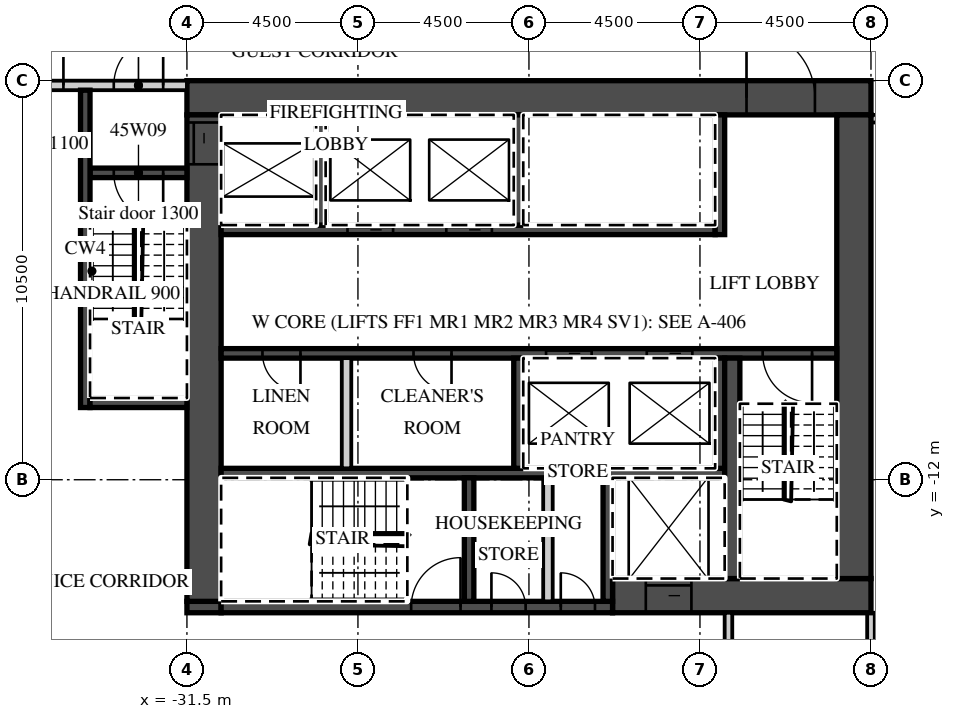
"""IFC4 building model, lengths in metres.
Left out: names, types, materials, properties, quantities, classifications, styles, units other than length and angle.
Written with IfcOpenShell. Run it as: python <this file> out.ifc"""

import sys

from ifc_helpers import new_model, si_unit, direction, frame, frame_2d, origin, place, context, subcontext, project, spatial, rectangle, extrude, element, fill, save


model = new_model("IFC4")
c1 = context("Model", 3, precision=1e-05, world=origin(), true_north=direction((0.0, 1.0)))
c2 = subcontext(c1, "Body", "Model", "MODEL_VIEW")
j1 = project(units=[si_unit("LENGTHUNIT", "METRE"), si_unit("PLANEANGLEUNIT", "RADIAN")], contexts=[c1])
p1 = place(None, origin())
s1 = spatial("IfcSite", under=j1, at=p1, CompositionType="ELEMENT")
p2 = place(p1, origin())
s2 = spatial("IfcBuilding", under=s1, at=p2, CompositionType="ELEMENT")
p3 = place(p2, frame((0.0, 0.0, 190.0)))
s3 = spatial("IfcBuildingStorey", under=s2, at=p3, CompositionType="ELEMENT", Elevation=190.0)
p4 = place(p3, frame((-13.5, -22.3, 0.0), z_axis=(0.0, 0.0, 1.0), x_axis=(0.0, 1.0, 0.0)))
e1 = element("IfcWall", 1, at=p4, inside=s3, PredefinedType="PARTITIONING", context=c2, shape_type="SweptSolid", body=[
    extrude(rectangle(XDim=6.8, YDim=0.2, at=frame_2d((3.4, 0.0))), origin(), (0.0, 0.0, 1.0), 3.02),
])
p5 = place(p3, frame((-13.5, -2.5, 0.0), z_axis=(0.0, 0.0, 1.0), x_axis=(1.0, 0.0, 0.0)))
e2 = element("IfcWall", 2, at=p5, inside=s3, PredefinedType="PARTITIONING", context=c2, shape_type="SweptSolid", body=[
    extrude(rectangle(XDim=27.0, YDim=0.2, at=frame_2d((13.5, 0.0))), origin(), (0.0, 0.0, 1.0), 3.02),
])
p6 = place(p5, frame((0.575, 0.0, 0.0)))
e3 = element("IfcOpeningElement", 3, at=p6, cuts=e2, PredefinedType="OPENING", context=c2, shape_type="SweptSolid", body=[
    extrude(rectangle(XDim=1.0, YDim=2.1, at=frame_2d((0.5, 1.05))), frame((0.0, 0.11, 0.0), z_axis=(0.0, -1.0, 0.0), x_axis=(1.0, 0.0, 0.0)), (0.0, 0.0, 1.0), 0.22),
])
p7 = place(p5, frame((7.45, 0.0, 0.0)))
e4 = element("IfcOpeningElement", 4, at=p7, cuts=e2, PredefinedType="OPENING", context=c2, shape_type="SweptSolid", body=[
    extrude(rectangle(XDim=1.0, YDim=2.1, at=frame_2d((0.5, 1.05))), frame((0.0, 0.11, 0.0), z_axis=(0.0, -1.0, 0.0), x_axis=(1.0, 0.0, 0.0)), (0.0, 0.0, 1.0), 0.22),
])
p8 = place(p5, frame((9.55, 0.0, 0.0)))
e5 = element("IfcOpeningElement", 5, at=p8, cuts=e2, PredefinedType="OPENING", context=c2, shape_type="SweptSolid", body=[
    extrude(rectangle(XDim=1.0, YDim=2.1, at=frame_2d((0.5, 1.05))), frame((0.0, 0.11, 0.0), z_axis=(0.0, -1.0, 0.0), x_axis=(1.0, 0.0, 0.0)), (0.0, 0.0, 1.0), 0.22),
])
p9 = place(p5, frame((18.862, 0.0, 0.0)))
e6 = element("IfcOpeningElement", 6, at=p9, cuts=e2, PredefinedType="OPENING", context=c2, shape_type="SweptSolid", body=[
    extrude(rectangle(XDim=1.2, YDim=2.1, at=frame_2d((0.6, 1.05))), frame((0.0, 0.11, 0.0), z_axis=(0.0, -1.0, 0.0), x_axis=(1.0, 0.0, 0.0)), (0.0, 0.0, 1.0), 0.22),
])
p10 = place(p5, frame((23.075, 0.0, 0.0)))
e7 = element("IfcOpeningElement", 7, at=p10, cuts=e2, PredefinedType="OPENING", context=c2, shape_type="SweptSolid", body=[
    extrude(rectangle(XDim=1.0, YDim=2.1, at=frame_2d((0.5, 1.05))), frame((0.0, 0.11, 0.0), z_axis=(0.0, -1.0, 0.0), x_axis=(1.0, 0.0, 0.0)), (0.0, 0.0, 1.0), 0.22),
])
p11 = place(p3, frame((-31.5, -1.95, 0.0), z_axis=(0.0, 0.0, 1.0), x_axis=(1.0, 0.0, 0.0)))
e8 = element("IfcWall", 8, at=p11, inside=s3, PredefinedType="SHEAR", context=c2, shape_type="SweptSolid", body=[
    extrude(rectangle(XDim=18.0, YDim=0.9, at=frame_2d((9.0, 0.0))), origin(), (0.0, 0.0, 1.0), 3.02),
])
p12 = place(p11, frame((14.725, 0.0, 0.0)))
e9 = element("IfcOpeningElement", 9, at=p12, cuts=e8, PredefinedType="OPENING", context=c2, shape_type="SweptSolid", body=[
    extrude(rectangle(XDim=1.8, YDim=2.1, at=frame_2d((0.9, 1.05))), frame((0.0, 0.46, 0.0), z_axis=(0.0, -1.0, 0.0), x_axis=(1.0, 0.0, 0.0)), (0.0, 0.0, 1.0), 0.92),
])
p13 = place(p3, frame((-20.3, -15.05, 0.0), z_axis=(0.0, 0.0, 1.0), x_axis=(1.0, 0.0, 0.0)))
e10 = element("IfcWall", 10, at=p13, inside=s3, PredefinedType="SHEAR", context=c2, shape_type="SweptSolid", body=[
    extrude(rectangle(XDim=6.8, YDim=0.9, at=frame_2d((3.4, 0.0))), origin(), (0.0, 0.0, 1.0), 3.02),
])
p14 = place(p13, frame((0.875, 0.0, 0.0)))
e11 = element("IfcOpeningElement", 11, at=p14, cuts=e10, PredefinedType="OPENING", context=c2, shape_type="SweptSolid", body=[
    extrude(rectangle(XDim=1.2, YDim=2.1, at=frame_2d((0.6, 1.05))), frame((0.0, 0.46, 0.0), z_axis=(0.0, -1.0, 0.0), x_axis=(1.0, 0.0, 0.0)), (0.0, 0.0, 1.0), 0.92),
])
p15 = place(p3, frame((-31.5, -15.35, 0.0), z_axis=(0.0, 0.0, 1.0), x_axis=(1.0, 0.0, 0.0)))
e12 = element("IfcWall", 12, at=p15, inside=s3, PredefinedType="SHEAR", context=c2, shape_type="SweptSolid", body=[
    extrude(rectangle(XDim=0.9, YDim=0.3, at=frame_2d((0.45, 0.0))), origin(), (0.0, 0.0, 1.0), 3.02),
])
p16 = place(p3, frame((-30.6, -15.35, 0.0), z_axis=(0.0, 0.0, 1.0), x_axis=(1.0, 0.0, 0.0)))
e13 = element("IfcWall", 13, at=p16, inside=s3, PredefinedType="SHEAR", context=c2, shape_type="SweptSolid", body=[
    extrude(rectangle(XDim=10.3, YDim=0.3, at=frame_2d((5.15, 0.0))), origin(), (0.0, 0.0, 1.0), 3.02),
])
p17 = place(p16, frame((5.0, 0.0, 0.0)))
e14 = element("IfcOpeningElement", 14, at=p17, cuts=e13, PredefinedType="OPENING", context=c2, shape_type="SweptSolid", body=[
    extrude(rectangle(XDim=1.3, YDim=2.1, at=frame_2d((0.65, 1.05))), frame((0.0, 0.16, 0.0), z_axis=(0.0, -1.0, 0.0), x_axis=(1.0, 0.0, 0.0)), (0.0, 0.0, 1.0), 0.32),
])
p18 = place(p16, frame((7.113, 0.0, 0.0)))
e15 = element("IfcOpeningElement", 15, at=p18, cuts=e13, PredefinedType="OPENING", context=c2, shape_type="SweptSolid", body=[
    extrude(rectangle(XDim=0.9, YDim=2.1, at=frame_2d((0.45, 1.05))), frame((0.0, 0.16, 0.0), z_axis=(0.0, -1.0, 0.0), x_axis=(1.0, 0.0, 0.0)), (0.0, 0.0, 1.0), 0.32),
])
p19 = place(p16, frame((8.938, 0.0, 0.0)))
e16 = element("IfcOpeningElement", 16, at=p19, cuts=e13, PredefinedType="OPENING", context=c2, shape_type="SweptSolid", body=[
    extrude(rectangle(XDim=0.9, YDim=2.1, at=frame_2d((0.45, 1.05))), frame((0.0, 0.16, 0.0), z_axis=(0.0, -1.0, 0.0), x_axis=(1.0, 0.0, 0.0)), (0.0, 0.0, 1.0), 0.32),
])
p20 = place(p3, frame((-31.05, -15.2, 0.0), z_axis=(0.0, 0.0, 1.0), x_axis=(0.0, 1.0, 0.0)))
e17 = element("IfcWall", 17, at=p20, inside=s3, PredefinedType="SHEAR", context=c2, shape_type="SweptSolid", body=[
    extrude(rectangle(XDim=12.8, YDim=0.9, at=frame_2d((6.4, 0.0))), origin(), (0.0, 0.0, 1.0), 3.02),
])
p21 = place(p20, frame((11.5, 0.0, 0.0)))
e18 = element("IfcOpeningElement", 18, at=p21, cuts=e17, PredefinedType="OPENING", context=c2, shape_type="SweptSolid", body=[
    extrude(rectangle(XDim=1.1, YDim=2.1, at=frame_2d((0.55, 1.05))), frame((0.0, 0.46, 0.0), z_axis=(0.0, -1.0, 0.0), x_axis=(1.0, 0.0, 0.0)), (0.0, 0.0, 1.0), 0.92),
])
p22 = place(p3, frame((-13.95, -14.6, 0.0), z_axis=(0.0, 0.0, 1.0), x_axis=(0.0, 1.0, 0.0)))
e19 = element("IfcWall", 19, at=p22, inside=s3, PredefinedType="SHEAR", context=c2, shape_type="SweptSolid", body=[
    extrude(rectangle(XDim=12.2, YDim=0.9, at=frame_2d((6.1, 0.0))), origin(), (0.0, 0.0, 1.0), 3.02),
])
p23 = place(p3, frame((-30.6, -5.425, 0.0), z_axis=(0.0, 0.0, 1.0), x_axis=(1.0, 0.0, 0.0)))
e20 = element("IfcWall", 20, at=p23, inside=s3, PredefinedType="SHEAR", context=c2, shape_type="SweptSolid", body=[
    extrude(rectangle(XDim=13.0, YDim=0.25, at=frame_2d((6.5, 0.0))), origin(), (0.0, 0.0, 1.0), 3.02),
])
p24 = place(p23, frame((3.325, 0.0, 0.0)))
e21 = element("IfcOpeningElement", 21, at=p24, cuts=e20, PredefinedType="OPENING", context=c2, shape_type="SweptSolid", body=[
    extrude(rectangle(XDim=1.2, YDim=2.1, at=frame_2d((0.6, 1.05))), frame((0.0, 0.135, 0.0), z_axis=(0.0, -1.0, 0.0), x_axis=(1.0, 0.0, 0.0)), (0.0, 0.0, 1.0), 0.27),
])
p25 = place(p23, frame((5.925, 0.0, 0.0)))
e22 = element("IfcOpeningElement", 22, at=p25, cuts=e20, PredefinedType="OPENING", context=c2, shape_type="SweptSolid", body=[
    extrude(rectangle(XDim=1.2, YDim=2.1, at=frame_2d((0.6, 1.05))), frame((0.0, 0.135, 0.0), z_axis=(0.0, -1.0, 0.0), x_axis=(1.0, 0.0, 0.0)), (0.0, 0.0, 1.0), 0.27),
])
p26 = place(p3, frame((-17.475, -5.55, 0.0), z_axis=(0.0, 0.0, 1.0), x_axis=(0.0, 1.0, 0.0)))
e23 = element("IfcWall", 23, at=p26, inside=s3, PredefinedType="SHEAR", context=c2, shape_type="SweptSolid", body=[
    extrude(rectangle(XDim=3.15, YDim=0.25, at=frame_2d((1.575, 0.0))), origin(), (0.0, 0.0, 1.0), 3.02),
])
for number, where, z_axis, x_axis in (
    (24, (-27.975, -5.3, 0.0), (0.0, 0.0, 1.0), (0.0, 1.0, 0.0)),
    (25, (-22.775, -5.3, 0.0), (0.0, 0.0, 1.0), (0.0, 1.0, 0.0)),
):
    element("IfcWall", number, at=place(p3, frame(where, z_axis=z_axis, x_axis=x_axis)), inside=s3, PredefinedType="SHEAR", context=c2, shape_type="SweptSolid", body=[
        extrude(rectangle(XDim=2.9, YDim=0.25, at=frame_2d((1.45, 0.0))), origin(), (0.0, 0.0, 1.0), 3.02),
    ])
p27 = place(p3, frame((-30.6, -8.675, 0.0), z_axis=(0.0, 0.0, 1.0), x_axis=(1.0, 0.0, 0.0)))
e26 = element("IfcWall", 26, at=p27, inside=s3, PredefinedType="SHEAR", context=c2, shape_type="SweptSolid", body=[
    extrude(rectangle(XDim=16.2, YDim=0.25, at=frame_2d((8.1, 0.0))), origin(), (0.0, 0.0, 1.0), 3.02),
])
p28 = place(p27, frame((8.55, 0.0, 0.0)))
e27 = element("IfcOpeningElement", 27, at=p28, cuts=e26, PredefinedType="OPENING", context=c2, shape_type="SweptSolid", body=[
    extrude(rectangle(XDim=1.2, YDim=2.1, at=frame_2d((0.6, 1.05))), frame((0.0, 0.135, 0.0), z_axis=(0.0, -1.0, 0.0), x_axis=(1.0, 0.0, 0.0)), (0.0, 0.0, 1.0), 0.27),
])
p29 = place(p27, frame((11.2, 0.0, 0.0)))
e28 = element("IfcOpeningElement", 28, at=p29, cuts=e26, PredefinedType="OPENING", context=c2, shape_type="SweptSolid", body=[
    extrude(rectangle(XDim=1.2, YDim=2.1, at=frame_2d((0.6, 1.05))), frame((0.0, 0.135, 0.0), z_axis=(0.0, -1.0, 0.0), x_axis=(1.0, 0.0, 0.0)), (0.0, 0.0, 1.0), 0.27),
])
p30 = place(p27, frame((14.25, 0.0, 0.0)))
e29 = element("IfcOpeningElement", 29, at=p30, cuts=e26, PredefinedType="OPENING", context=c2, shape_type="SweptSolid", body=[
    extrude(rectangle(XDim=1.3, YDim=2.1, at=frame_2d((0.65, 1.05))), frame((0.0, 0.135, 0.0), z_axis=(0.0, -1.0, 0.0), x_axis=(1.0, 0.0, 0.0)), (0.0, 0.0, 1.0), 0.27),
])
p31 = place(p27, frame((1.087, 0.0, 0.0)))
e30 = element("IfcOpeningElement", 30, at=p31, cuts=e26, PredefinedType="OPENING", context=c2, shape_type="SweptSolid", body=[
    extrude(rectangle(XDim=1.0, YDim=2.1, at=frame_2d((0.5, 1.05))), frame((0.0, 0.135, 0.0), z_axis=(0.0, -1.0, 0.0), x_axis=(1.0, 0.0, 0.0)), (0.0, 0.0, 1.0), 0.27),
])
p32 = place(p27, frame((5.062, 0.0, 0.0)))
e31 = element("IfcOpeningElement", 31, at=p32, cuts=e26, PredefinedType="OPENING", context=c2, shape_type="SweptSolid", body=[
    extrude(rectangle(XDim=1.0, YDim=2.1, at=frame_2d((0.5, 1.05))), frame((0.0, 0.135, 0.0), z_axis=(0.0, -1.0, 0.0), x_axis=(1.0, 0.0, 0.0)), (0.0, 0.0, 1.0), 0.27),
])
p33 = place(p3, frame((-30.6, -11.825, 0.0), z_axis=(0.0, 0.0, 1.0), x_axis=(1.0, 0.0, 0.0)))
e32 = element("IfcWall", 32, at=p33, inside=s3, PredefinedType="SHEAR", context=c2, shape_type="SweptSolid", body=[
    extrude(rectangle(XDim=13.25, YDim=0.25, at=frame_2d((6.625, 0.0))), origin(), (0.0, 0.0, 1.0), 3.02),
])
for number, where, z_axis, x_axis in (
    (33, (-17.475, -11.7, 0.0), (0.0, 0.0, 1.0), (0.0, 1.0, 0.0)),
    (34, (-22.775, -11.7, 0.0), (0.0, 0.0, 1.0), (0.0, 1.0, 0.0)),
):
    element("IfcWall", number, at=place(p3, frame(where, z_axis=z_axis, x_axis=x_axis)), inside=s3, PredefinedType="SHEAR", context=c2, shape_type="SweptSolid", body=[
        extrude(rectangle(XDim=2.9, YDim=0.25, at=frame_2d((1.45, 0.0))), origin(), (0.0, 0.0, 1.0), 3.02),
    ])
p34 = place(p3, frame((-27.3, -11.7, 0.0), z_axis=(0.0, 0.0, 1.0), x_axis=(0.0, 1.0, 0.0)))
e35 = element("IfcWall", 35, at=p34, inside=s3, PredefinedType="PARTITIONING", context=c2, shape_type="SweptSolid", body=[
    extrude(rectangle(XDim=2.9, YDim=0.25, at=frame_2d((1.45, 0.0))), origin(), (0.0, 0.0, 1.0), 3.02),
])
p35 = place(p3, frame((-17.15, -14.6, 0.0), z_axis=(0.0, 0.0, 1.0), x_axis=(0.0, 1.0, 0.0)))
e36 = element("IfcWall", 36, at=p35, inside=s3, PredefinedType="SHEAR", context=c2, shape_type="SweptSolid", body=[
    extrude(rectangle(XDim=5.8, YDim=0.4, at=frame_2d((2.9, 0.0))), origin(), (0.0, 0.0, 1.0), 3.02),
])
for number, where, z_axis, x_axis in (
    (37, (-20.425, -15.2, 0.0), (0.0, 0.0, 1.0), (0.0, 1.0, 0.0)),
    (38, (-24.075, -15.2, 0.0), (0.0, 0.0, 1.0), (0.0, 1.0, 0.0)),
):
    element("IfcWall", number, at=place(p3, frame(where, z_axis=z_axis, x_axis=x_axis)), inside=s3, PredefinedType="SHEAR", context=c2, shape_type="SweptSolid", body=[
        extrude(rectangle(XDim=3.25, YDim=0.25, at=frame_2d((1.625, 0.0))), origin(), (0.0, 0.0, 1.0), 3.02),
    ])
p36 = place(p3, frame((-22.0, -15.2, 0.0), z_axis=(0.0, 0.0, 1.0), x_axis=(0.0, 1.0, 0.0)))
e39 = element("IfcWall", 39, at=p36, inside=s3, PredefinedType="PARTITIONING", context=c2, shape_type="SweptSolid", body=[
    extrude(rectangle(XDim=3.25, YDim=0.25, at=frame_2d((1.625, 0.0))), origin(), (0.0, 0.0, 1.0), 3.02),
])
p37 = place(p3, frame((-42.632, -1.625, 0.0), z_axis=(0.0, 0.0, 1.0), x_axis=(1.0, 0.0, 0.0)))
e40 = element("IfcWall", 40, at=p37, inside=s3, PredefinedType="PARTITIONING", context=c2, shape_type="SweptSolid", body=[
    extrude(rectangle(XDim=11.132, YDim=0.25, at=frame_2d((5.566, 0.0))), origin(), (0.0, 0.0, 1.0), 3.02),
])
p38 = place(p37, frame((9.207, 0.0, 0.0)))
e41 = element("IfcOpeningElement", 41, at=p38, cuts=e40, PredefinedType="OPENING", context=c2, shape_type="SweptSolid", body=[
    extrude(rectangle(XDim=1.3, YDim=2.1, at=frame_2d((0.65, 1.05))), frame((0.0, 0.135, 0.0), z_axis=(0.0, -1.0, 0.0), x_axis=(1.0, 0.0, 0.0)), (0.0, 0.0, 1.0), 0.27),
])
p39 = place(p37, frame((6.781, 0.0, 0.0)))
e42 = element("IfcOpeningElement", 42, at=p39, cuts=e40, PredefinedType="OPENING", context=c2, shape_type="SweptSolid", body=[
    extrude(rectangle(XDim=1.1, YDim=2.1, at=frame_2d((0.55, 1.05))), frame((0.0, 0.135, 0.0), z_axis=(0.0, -1.0, 0.0), x_axis=(1.0, 0.0, 0.0)), (0.0, 0.0, 1.0), 0.27),
])
p40 = place(p3, frame((-34.05, -3.925, 0.0), z_axis=(0.0, 0.0, 1.0), x_axis=(1.0, 0.0, 0.0)))
e43 = element("IfcWall", 43, at=p40, inside=s3, PredefinedType="SHEAR", context=c2, shape_type="SweptSolid", body=[
    extrude(rectangle(XDim=2.55, YDim=0.25, at=frame_2d((1.275, 0.0))), origin(), (0.0, 0.0, 1.0), 3.02),
])
p41 = place(p40, frame((0.625, 0.0, 0.0)))
e44 = element("IfcOpeningElement", 44, at=p41, cuts=e43, PredefinedType="OPENING", context=c2, shape_type="SweptSolid", body=[
    extrude(rectangle(XDim=1.3, YDim=2.1, at=frame_2d((0.65, 1.05))), frame((0.0, 0.135, 0.0), z_axis=(0.0, -1.0, 0.0), x_axis=(1.0, 0.0, 0.0)), (0.0, 0.0, 1.0), 0.27),
])
p42 = place(p3, frame((-34.175, -10.1, 0.0), z_axis=(0.0, 0.0, 1.0), x_axis=(0.0, 1.0, 0.0)))
e45 = element("IfcWall", 45, at=p42, inside=s3, PredefinedType="SHEAR", context=c2, shape_type="SweptSolid", body=[
    extrude(rectangle(XDim=8.35, YDim=0.25, at=frame_2d((4.175, 0.0))), origin(), (0.0, 0.0, 1.0), 3.02),
])
p43 = place(p3, frame((-34.05, -9.975, 0.0), z_axis=(0.0, 0.0, 1.0), x_axis=(1.0, 0.0, 0.0)))
e46 = element("IfcWall", 46, at=p43, inside=s3, PredefinedType="SHEAR", context=c2, shape_type="SweptSolid", body=[
    extrude(rectangle(XDim=2.55, YDim=0.25, at=frame_2d((1.275, 0.0))), origin(), (0.0, 0.0, 1.0), 3.02),
])
p44 = place(p3, frame((-17.25, -17.7, 0.0), z_axis=(0.0, 0.0, 1.0), x_axis=(0.0, 1.0, 0.0)))
e47 = element("IfcWall", 47, at=p44, inside=s3, PredefinedType="PARTITIONING", context=c2, shape_type="SweptSolid", body=[
    extrude(rectangle(XDim=2.2, YDim=0.2, at=frame_2d((1.1, 0.0))), origin(), (0.0, 0.0, 1.0), 3.02),
])
p45 = place(p28, origin())
e48 = element("IfcDoor", 48, at=p45, inside=s3, OperationType="SLIDING_TO_LEFT", PredefinedType="DOOR", context=c2, shape_type="SweptSolid", body=[
    extrude(rectangle(XDim=1.2, YDim=2.1, at=frame_2d((0.6, 1.05))), frame((0.0, 0.025, 0.0), z_axis=(0.0, -1.0, 0.0), x_axis=(1.0, 0.0, 0.0)), (0.0, 0.0, 1.0), 0.05),
])
fill(e27, e48)
p46 = place(p29, origin())
e49 = element("IfcDoor", 49, at=p46, inside=s3, OperationType="SLIDING_TO_RIGHT", PredefinedType="DOOR", context=c2, shape_type="SweptSolid", body=[
    extrude(rectangle(XDim=1.2, YDim=2.1, at=frame_2d((0.6, 1.05))), frame((0.0, 0.025, 0.0), z_axis=(0.0, -1.0, 0.0), x_axis=(1.0, 0.0, 0.0)), (0.0, 0.0, 1.0), 0.05),
])
fill(e28, e49)
p47 = place(p24, origin())
e50 = element("IfcDoor", 50, at=p47, inside=s3, OperationType="SLIDING_TO_RIGHT", PredefinedType="DOOR", context=c2, shape_type="SweptSolid", body=[
    extrude(rectangle(XDim=1.2, YDim=2.1, at=frame_2d((0.6, 1.05))), frame((0.0, 0.025, 0.0), z_axis=(0.0, -1.0, 0.0), x_axis=(1.0, 0.0, 0.0)), (0.0, 0.0, 1.0), 0.05),
])
fill(e21, e50)
p48 = place(p25, origin())
e51 = element("IfcDoor", 51, at=p48, inside=s3, OperationType="SLIDING_TO_RIGHT", PredefinedType="DOOR", context=c2, shape_type="SweptSolid", body=[
    extrude(rectangle(XDim=1.2, YDim=2.1, at=frame_2d((0.6, 1.05))), frame((0.0, 0.025, 0.0), z_axis=(0.0, -1.0, 0.0), x_axis=(1.0, 0.0, 0.0)), (0.0, 0.0, 1.0), 0.05),
])
fill(e22, e51)
p49 = place(p14, origin())
e52 = element("IfcDoor", 52, at=p49, inside=s3, OperationType="SLIDING_TO_LEFT", PredefinedType="DOOR", context=c2, shape_type="SweptSolid", body=[
    extrude(rectangle(XDim=1.2, YDim=2.1, at=frame_2d((0.6, 1.05))), frame((0.0, 0.025, 0.0), z_axis=(0.0, -1.0, 0.0), x_axis=(1.0, 0.0, 0.0)), (0.0, 0.0, 1.0), 0.05),
])
fill(e11, e52)
p50 = place(p21, origin())
e53 = element("IfcDoor", 53, at=p50, inside=s3, OperationType="SLIDING_TO_RIGHT", PredefinedType="DOOR", context=c2, shape_type="SweptSolid", body=[
    extrude(rectangle(XDim=1.1, YDim=2.1, at=frame_2d((0.55, 1.05))), frame((0.0, 0.025, 0.0), z_axis=(0.0, -1.0, 0.0), x_axis=(1.0, 0.0, 0.0)), (0.0, 0.0, 1.0), 0.05),
])
fill(e18, e53)
p51 = place(p12, origin())
e54 = element("IfcDoor", 54, at=p51, inside=s3, OperationType="DOUBLE_DOOR_DOUBLE_SWING", PredefinedType="DOOR", context=c2, shape_type="SweptSolid", body=[
    extrude(rectangle(XDim=1.8, YDim=2.1, at=frame_2d((0.9, 1.05))), frame((0.0, 0.025, 0.0), z_axis=(0.0, -1.0, 0.0), x_axis=(1.0, 0.0, 0.0)), (0.0, 0.0, 1.0), 0.05),
])
fill(e9, e54)
p52 = place(p38, origin())
e55 = element("IfcDoor", 55, at=p52, inside=s3, OperationType="SINGLE_SWING_RIGHT", PredefinedType="DOOR", context=c2, shape_type="SweptSolid", body=[
    extrude(rectangle(XDim=1.3, YDim=2.1, at=frame_2d((0.65, 1.05))), frame((0.0, 0.025, 0.0), z_axis=(0.0, -1.0, 0.0), x_axis=(1.0, 0.0, 0.0)), (0.0, 0.0, 1.0), 0.05),
])
fill(e41, e55)
p53 = place(p41, origin())
e56 = element("IfcDoor", 56, at=p53, inside=s3, OperationType="SINGLE_SWING_RIGHT", PredefinedType="DOOR", context=c2, shape_type="SweptSolid", body=[
    extrude(rectangle(XDim=1.3, YDim=2.1, at=frame_2d((0.65, 1.05))), frame((0.0, 0.025, 0.0), z_axis=(0.0, -1.0, 0.0), x_axis=(1.0, 0.0, 0.0)), (0.0, 0.0, 1.0), 0.05),
])
fill(e44, e56)
p54 = place(p39, origin())
e57 = element("IfcDoor", 57, at=p54, inside=s3, OperationType="SINGLE_SWING_RIGHT", PredefinedType="DOOR", context=c2, shape_type="SweptSolid", body=[
    extrude(rectangle(XDim=1.1, YDim=2.1, at=frame_2d((0.55, 1.05))), frame((0.0, 0.025, 0.0), z_axis=(0.0, -1.0, 0.0), x_axis=(1.0, 0.0, 0.0)), (0.0, 0.0, 1.0), 0.05),
])
fill(e42, e57)
p55 = place(p30, origin())
e58 = element("IfcDoor", 58, at=p55, inside=s3, OperationType="SINGLE_SWING_RIGHT", PredefinedType="DOOR", context=c2, shape_type="SweptSolid", body=[
    extrude(rectangle(XDim=1.3, YDim=2.1, at=frame_2d((0.65, 1.05))), frame((0.0, 0.025, 0.0), z_axis=(0.0, -1.0, 0.0), x_axis=(1.0, 0.0, 0.0)), (0.0, 0.0, 1.0), 0.05),
])
fill(e29, e58)
p56 = place(p17, origin())
e59 = element("IfcDoor", 59, at=p56, inside=s3, OperationType="SINGLE_SWING_RIGHT", PredefinedType="DOOR", context=c2, shape_type="SweptSolid", body=[
    extrude(rectangle(XDim=1.3, YDim=2.1, at=frame_2d((0.65, 1.05))), frame((0.0, 0.025, 0.0), z_axis=(0.0, -1.0, 0.0), x_axis=(1.0, 0.0, 0.0)), (0.0, 0.0, 1.0), 0.05),
])
fill(e14, e59)
p57 = place(p18, origin())
e60 = element("IfcDoor", 60, at=p57, inside=s3, OperationType="SINGLE_SWING_LEFT", PredefinedType="DOOR", context=c2, shape_type="SweptSolid", body=[
    extrude(rectangle(XDim=0.9, YDim=2.1, at=frame_2d((0.45, 1.05))), frame((0.0, 0.025, 0.0), z_axis=(0.0, -1.0, 0.0), x_axis=(1.0, 0.0, 0.0)), (0.0, 0.0, 1.0), 0.05),
])
fill(e15, e60)
p58 = place(p19, origin())
e61 = element("IfcDoor", 61, at=p58, inside=s3, OperationType="SINGLE_SWING_LEFT", PredefinedType="DOOR", context=c2, shape_type="SweptSolid", body=[
    extrude(rectangle(XDim=0.9, YDim=2.1, at=frame_2d((0.45, 1.05))), frame((0.0, 0.025, 0.0), z_axis=(0.0, -1.0, 0.0), x_axis=(1.0, 0.0, 0.0)), (0.0, 0.0, 1.0), 0.05),
])
fill(e16, e61)
p59 = place(p31, origin())
e62 = element("IfcDoor", 62, at=p59, inside=s3, OperationType="SINGLE_SWING_RIGHT", PredefinedType="DOOR", context=c2, shape_type="SweptSolid", body=[
    extrude(rectangle(XDim=1.0, YDim=2.1, at=frame_2d((0.5, 1.05))), frame((0.0, 0.025, 0.0), z_axis=(0.0, -1.0, 0.0), x_axis=(1.0, 0.0, 0.0)), (0.0, 0.0, 1.0), 0.05),
])
fill(e30, e62)
p60 = place(p32, origin())
e63 = element("IfcDoor", 63, at=p60, inside=s3, OperationType="SINGLE_SWING_RIGHT", PredefinedType="DOOR", context=c2, shape_type="SweptSolid", body=[
    extrude(rectangle(XDim=1.0, YDim=2.1, at=frame_2d((0.5, 1.05))), frame((0.0, 0.025, 0.0), z_axis=(0.0, -1.0, 0.0), x_axis=(1.0, 0.0, 0.0)), (0.0, 0.0, 1.0), 0.05),
])
fill(e31, e63)
save(model, sys.argv[1])
